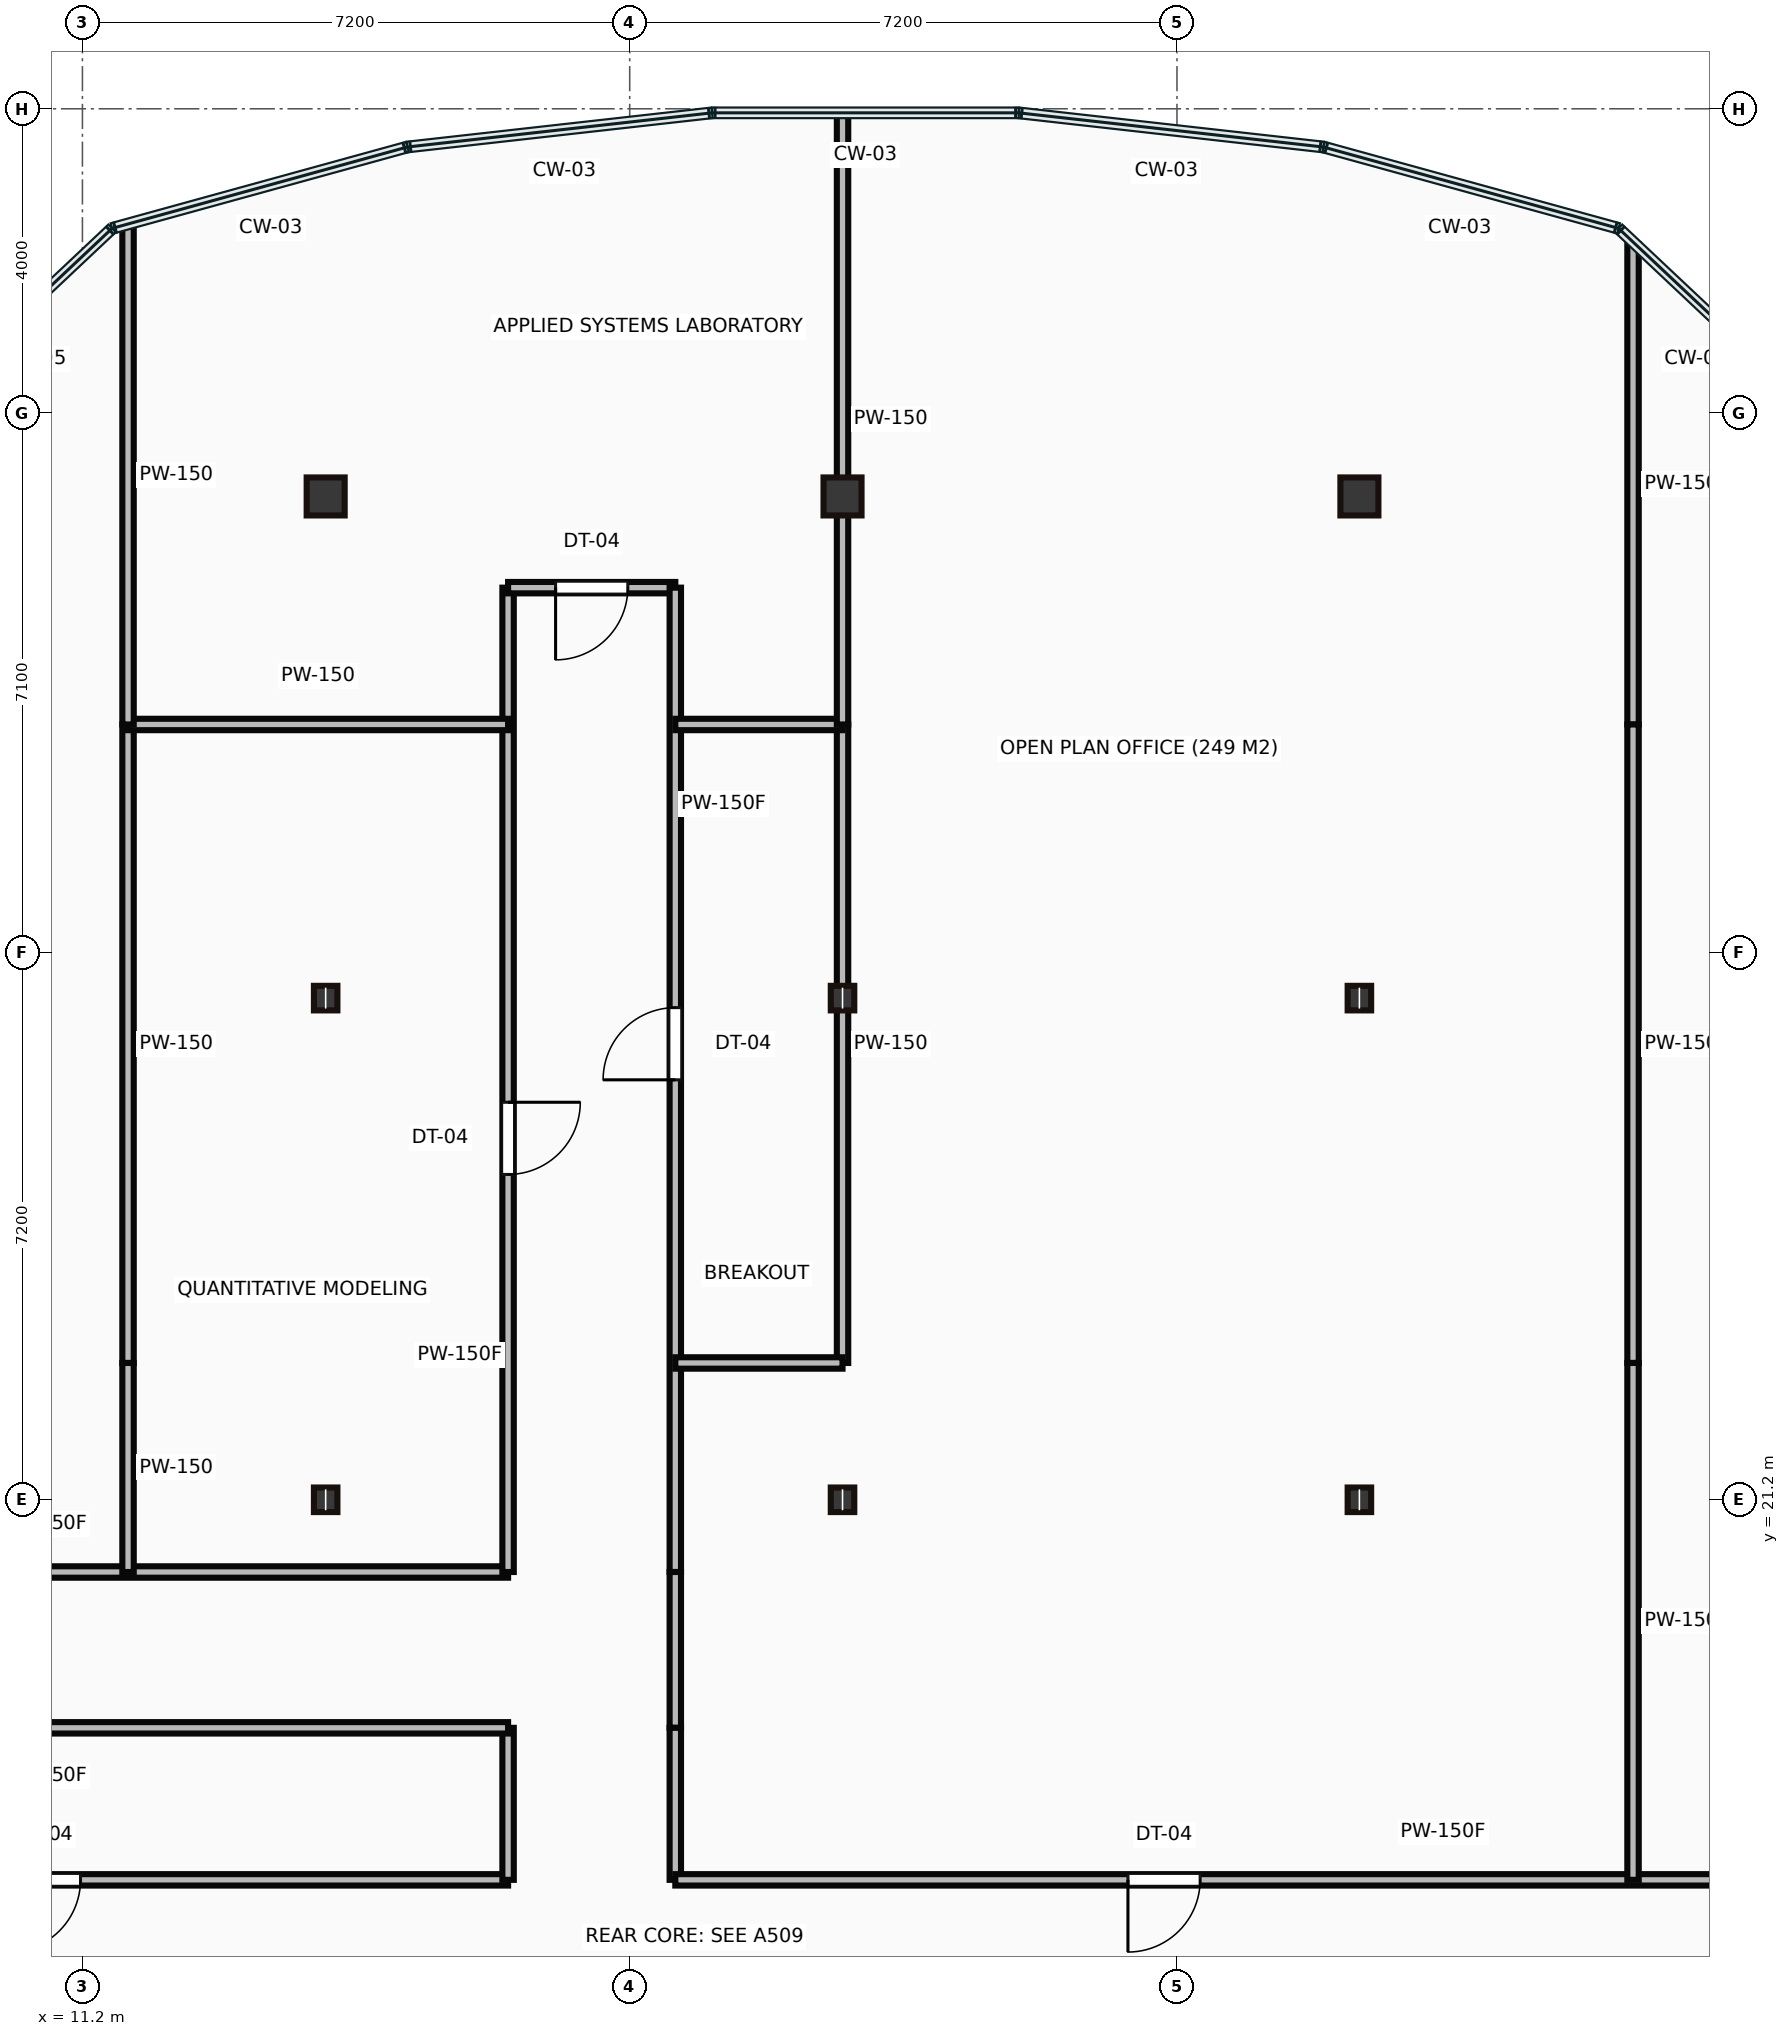
"""IFC4 building model, lengths in metres.
Left out: names, types, materials, properties, quantities, classifications, styles, units other than length and angle.
Written with IfcOpenShell. Run it as: python <this file> out.ifc"""

import sys

from ifc_helpers import new_model, si_unit, direction, frame, frame_2d, origin, origin_2d, place, context, subcontext, project, spatial, rectangle, hollow_rectangle, i_section, extrude, source, transform, mapped, element, fill, save


model = new_model("IFC4")
c1 = context("Model", 3, precision=1e-05, world=origin(), true_north=direction((0.0, 1.0)))
c2 = subcontext(c1, "Body", "Model", "MODEL_VIEW")
j1 = project(units=[si_unit("LENGTHUNIT", "METRE"), si_unit("PLANEANGLEUNIT", "RADIAN")], contexts=[c1])
p1 = place(None, origin())
s1 = spatial("IfcSite", under=j1, at=p1, CompositionType="ELEMENT")
p2 = place(p1, origin())
s2 = spatial("IfcBuilding", under=s1, at=p2, CompositionType="ELEMENT")
p3 = place(p2, frame((0.0, 0.0, 206.85)))
s3 = spatial("IfcBuildingStorey", under=s2, at=p3, CompositionType="ELEMENT", Elevation=206.85)
m1 = source(origin(), c2, "Body", "SweptSolid", [
    extrude(i_section(OverallWidth=0.309, OverallDepth=0.323, WebThickness=0.014, FlangeThickness=0.023, at=origin_2d()), origin(), (0.0, 0.0, 1.0), 3.65),
])
for number, where, z_axis, x_axis in (
    (1, (14.4, 21.2, 0.0), (0.0, 0.0, 1.0), (1.0, 0.0, 0.0)),
    (2, (14.4, 27.8, 0.0), (0.0, 0.0, 1.0), (1.0, 0.0, 0.0)),
):
    element("IfcColumn", number, at=place(p3, frame(where, z_axis=z_axis, x_axis=x_axis)), inside=s3, PredefinedType="COLUMN", context=c2, shape_type="MappedRepresentation", body=[
        mapped(m1, transform((0.0, 0.0, 0.0))),
    ])
m2 = source(origin(), c2, "Body", "SweptSolid", [
    extrude(hollow_rectangle(XDim=0.5, YDim=0.5, WallThickness=0.022, at=origin_2d()), origin(), (0.0, 0.0, 1.0), 3.65),
])
p4 = place(p3, frame((14.4, 34.4, 0.0), z_axis=(0.0, 0.0, 1.0), x_axis=(1.0, 0.0, 0.0)))
e3 = element("IfcColumn", 3, at=p4, inside=s3, PredefinedType="COLUMN", context=c2, shape_type="MappedRepresentation", body=[
    mapped(m2, transform((0.0, 0.0, 0.0))),
])
for number, where, z_axis, x_axis in (
    (4, (21.2, 21.2, 0.0), (0.0, 0.0, 1.0), (1.0, 0.0, 0.0)),
    (5, (21.2, 27.8, 0.0), (0.0, 0.0, 1.0), (1.0, 0.0, 0.0)),
):
    element("IfcColumn", number, at=place(p3, frame(where, z_axis=z_axis, x_axis=x_axis)), inside=s3, PredefinedType="COLUMN", context=c2, shape_type="MappedRepresentation", body=[
        mapped(m1, transform((0.0, 0.0, 0.0))),
    ])
p5 = place(p3, frame((21.2, 34.4, 0.0), z_axis=(0.0, 0.0, 1.0), x_axis=(1.0, 0.0, 0.0)))
e6 = element("IfcColumn", 6, at=p5, inside=s3, PredefinedType="COLUMN", context=c2, shape_type="MappedRepresentation", body=[
    mapped(m2, transform((0.0, 0.0, 0.0))),
])
for number, where, z_axis, x_axis in (
    (7, (28.0, 21.2, 0.0), (0.0, 0.0, 1.0), (1.0, 0.0, 0.0)),
    (8, (28.0, 27.8, 0.0), (0.0, 0.0, 1.0), (1.0, 0.0, 0.0)),
):
    element("IfcColumn", number, at=place(p3, frame(where, z_axis=z_axis, x_axis=x_axis)), inside=s3, PredefinedType="COLUMN", context=c2, shape_type="MappedRepresentation", body=[
        mapped(m1, transform((0.0, 0.0, 0.0))),
    ])
p6 = place(p3, frame((28.0, 34.4, 0.0), z_axis=(0.0, 0.0, 1.0), x_axis=(1.0, 0.0, 0.0)))
e9 = element("IfcColumn", 9, at=p6, inside=s3, PredefinedType="COLUMN", context=c2, shape_type="MappedRepresentation", body=[
    mapped(m2, transform((0.0, 0.0, 0.0))),
])
m3 = source(origin(), c2, "Body", "SweptSolid", [
    extrude(rectangle(XDim=12.2, YDim=0.15, at=frame_2d((6.1, 0.0))), origin(), (0.0, 0.0, 1.0), 3.4),
])
p7 = place(p3, frame((4.6, 16.2, 0.0), z_axis=(0.0, 0.0, 1.0), x_axis=(1.0, 0.0, 0.0)))
e10 = element("IfcWall", 10, at=p7, inside=s3, PredefinedType="PARTITIONING", context=c2, shape_type="MappedRepresentation", body=[
    mapped(m3, transform((0.0, 0.0, 0.0))),
])
p8 = place(p7, frame((5.625, 0.0, 0.0)))
e11 = element("IfcOpeningElement", 11, at=p8, cuts=e10, PredefinedType="OPENING", context=c2, shape_type="SweptSolid", body=[
    extrude(rectangle(XDim=0.95, YDim=2.15, at=frame_2d((0.475, 1.075))), frame((0.0, 0.085, 0.0), z_axis=(0.0, -1.0, 0.0), x_axis=(1.0, 0.0, 0.0)), (0.0, 0.0, 1.0), 0.17),
])
m4 = source(origin(), c2, "Body", "SweptSolid", [
    extrude(rectangle(XDim=2.0, YDim=0.15, at=frame_2d((1.0, 0.0))), origin(), (0.0, 0.0, 1.0), 3.4),
])
p9 = place(p3, frame((16.8, 16.2, 0.0), z_axis=(0.0, 0.0, 1.0), x_axis=(0.0, 1.0, 0.0)))
e12 = element("IfcWall", 12, at=p9, inside=s3, PredefinedType="PARTITIONING", context=c2, shape_type="MappedRepresentation", body=[
    mapped(m4, transform((0.0, 0.0, 0.0))),
])
for number, where, z_axis, x_axis in (
    (13, (16.8, 18.2, 0.0), (0.0, 0.0, 1.0), (-1.0, 0.0, 0.0)),
    (14, (4.6, 20.25, 0.0), (0.0, 0.0, 1.0), (1.0, 0.0, 0.0)),
):
    element("IfcWall", number, at=place(p3, frame(where, z_axis=z_axis, x_axis=x_axis)), inside=s3, PredefinedType="PARTITIONING", context=c2, shape_type="MappedRepresentation", body=[
        mapped(m3, transform((0.0, 0.0, 0.0))),
    ])
m5 = source(origin(), c2, "Body", "SweptSolid", [
    extrude(rectangle(XDim=12.95, YDim=0.15, at=frame_2d((6.475, 0.0))), origin(), (0.0, 0.0, 1.0), 3.4),
])
p10 = place(p3, frame((16.8, 20.25, 0.0), z_axis=(0.0, 0.0, 1.0), x_axis=(0.0, 1.0, 0.0)))
e15 = element("IfcWall", 15, at=p10, inside=s3, PredefinedType="PARTITIONING", context=c2, shape_type="MappedRepresentation", body=[
    mapped(m5, transform((0.0, 0.0, 0.0))),
])
p11 = place(p10, frame((5.23, 0.0, 0.0)))
e16 = element("IfcOpeningElement", 16, at=p11, cuts=e15, PredefinedType="OPENING", context=c2, shape_type="SweptSolid", body=[
    extrude(rectangle(XDim=0.95, YDim=2.15, at=frame_2d((0.475, 1.075))), frame((0.0, 0.085, 0.0), z_axis=(0.0, -1.0, 0.0), x_axis=(1.0, 0.0, 0.0)), (0.0, 0.0, 1.0), 0.17),
])
m6 = source(origin(), c2, "Body", "SweptSolid", [
    extrude(rectangle(XDim=2.2, YDim=0.15, at=frame_2d((1.1, 0.0))), origin(), (0.0, 0.0, 1.0), 3.4),
])
p12 = place(p3, frame((16.8, 33.2, 0.0), z_axis=(0.0, 0.0, 1.0), x_axis=(1.0, 0.0, 0.0)))
e17 = element("IfcWall", 17, at=p12, inside=s3, PredefinedType="PARTITIONING", context=c2, shape_type="MappedRepresentation", body=[
    mapped(m6, transform((0.0, 0.0, 0.0))),
])
p13 = place(p12, frame((0.625, 0.0, 0.0)))
e18 = element("IfcOpeningElement", 18, at=p13, cuts=e17, PredefinedType="OPENING", context=c2, shape_type="SweptSolid", body=[
    extrude(rectangle(XDim=0.95, YDim=2.15, at=frame_2d((0.475, 1.075))), frame((0.0, 0.085, 0.0), z_axis=(0.0, -1.0, 0.0), x_axis=(1.0, 0.0, 0.0)), (0.0, 0.0, 1.0), 0.17),
])
p14 = place(p3, frame((19.0, 33.2, 0.0), z_axis=(0.0, 0.0, 1.0), x_axis=(0.0, -1.0, 0.0)))
e19 = element("IfcWall", 19, at=p14, inside=s3, PredefinedType="PARTITIONING", context=c2, shape_type="MappedRepresentation", body=[
    mapped(m5, transform((0.0, 0.0, 0.0))),
])
p15 = place(p14, frame((5.525, 0.0, 0.0)))
e20 = element("IfcOpeningElement", 20, at=p15, cuts=e19, PredefinedType="OPENING", context=c2, shape_type="SweptSolid", body=[
    extrude(rectangle(XDim=0.95, YDim=2.15, at=frame_2d((0.475, 1.075))), frame((0.0, 0.085, 0.0), z_axis=(0.0, -1.0, 0.0), x_axis=(1.0, 0.0, 0.0)), (0.0, 0.0, 1.0), 0.17),
])
m7 = source(origin(), c2, "Body", "SweptSolid", [
    extrude(rectangle(XDim=2.05, YDim=0.15, at=frame_2d((1.025, 0.0))), origin(), (0.0, 0.0, 1.0), 3.4),
])
p16 = place(p3, frame((19.0, 20.25, 0.0), z_axis=(0.0, 0.0, 1.0), x_axis=(0.0, -1.0, 0.0)))
e21 = element("IfcWall", 21, at=p16, inside=s3, PredefinedType="PARTITIONING", context=c2, shape_type="MappedRepresentation", body=[
    mapped(m7, transform((0.0, 0.0, 0.0))),
])
p17 = place(p3, frame((19.0, 18.2, 0.0), z_axis=(0.0, 0.0, 1.0), x_axis=(0.0, -1.0, 0.0)))
e22 = element("IfcWall", 22, at=p17, inside=s3, PredefinedType="PARTITIONING", context=c2, shape_type="MappedRepresentation", body=[
    mapped(m4, transform((0.0, 0.0, 0.0))),
])
m8 = source(origin(), c2, "Body", "SweptSolid", [
    extrude(rectangle(XDim=20.2, YDim=0.15, at=frame_2d((10.1, 0.0))), origin(), (0.0, 0.0, 1.0), 3.4),
])
p18 = place(p3, frame((19.0, 16.2, 0.0), z_axis=(0.0, 0.0, 1.0), x_axis=(1.0, 0.0, 0.0)))
e23 = element("IfcWall", 23, at=p18, inside=s3, PredefinedType="PARTITIONING", context=c2, shape_type="MappedRepresentation", body=[
    mapped(m8, transform((0.0, 0.0, 0.0))),
])
p19 = place(p18, frame((5.955, 0.0, 0.0)))
e24 = element("IfcOpeningElement", 24, at=p19, cuts=e23, PredefinedType="OPENING", context=c2, shape_type="SweptSolid", body=[
    extrude(rectangle(XDim=0.95, YDim=2.15, at=frame_2d((0.475, 1.075))), frame((0.0, 0.085, 0.0), z_axis=(0.0, -1.0, 0.0), x_axis=(1.0, 0.0, 0.0)), (0.0, 0.0, 1.0), 0.17),
])
p20 = place(p18, frame((15.795, 0.0, 0.0)))
e25 = element("IfcOpeningElement", 25, at=p20, cuts=e23, PredefinedType="OPENING", context=c2, shape_type="SweptSolid", body=[
    extrude(rectangle(XDim=0.95, YDim=2.15, at=frame_2d((0.475, 1.075))), frame((0.0, 0.085, 0.0), z_axis=(0.0, -1.0, 0.0), x_axis=(1.0, 0.0, 0.0)), (0.0, 0.0, 1.0), 0.17),
])
m9 = source(origin(), c2, "Body", "SweptSolid", [
    extrude(rectangle(XDim=8.4, YDim=0.15, at=frame_2d((4.2, 0.0))), origin(), (0.0, 0.0, 1.0), 3.4),
])
p21 = place(p3, frame((11.8, 31.4, 0.0), z_axis=(0.0, 0.0, 1.0), x_axis=(0.0, -1.0, 0.0)))
e26 = element("IfcWall", 26, at=p21, inside=s3, PredefinedType="PARTITIONING", context=c2, shape_type="MappedRepresentation", body=[
    mapped(m9, transform((0.0, 0.0, 0.0))),
])
m10 = source(origin(), c2, "Body", "SweptSolid", [
    extrude(rectangle(XDim=2.75, YDim=0.15, at=frame_2d((1.375, 0.0))), origin(), (0.0, 0.0, 1.0), 3.4),
])
p22 = place(p3, frame((11.8, 23.0, 0.0), z_axis=(0.0, 0.0, 1.0), x_axis=(0.0, -1.0, 0.0)))
e27 = element("IfcWall", 27, at=p22, inside=s3, PredefinedType="PARTITIONING", context=c2, shape_type="MappedRepresentation", body=[
    mapped(m10, transform((0.0, 0.0, 0.0))),
])
m11 = source(origin(), c2, "Body", "SweptSolid", [
    extrude(rectangle(XDim=5.0, YDim=0.15, at=frame_2d((2.5, 0.0))), origin(), (0.0, 0.0, 1.0), 3.4),
])
p23 = place(p3, frame((11.8, 31.4, 0.0), z_axis=(0.0, 0.0, 1.0), x_axis=(1.0, 0.0, 0.0)))
e28 = element("IfcWall", 28, at=p23, inside=s3, PredefinedType="PARTITIONING", context=c2, shape_type="MappedRepresentation", body=[
    mapped(m11, transform((0.0, 0.0, 0.0))),
])
m12 = source(origin(), c2, "Body", "SweptSolid", [
    extrude(rectangle(XDim=6.564, YDim=0.15, at=frame_2d((3.282, 0.0))), origin(), (0.0, 0.0, 1.0), 3.4),
])
p24 = place(p3, frame((11.8, 37.964, 0.0), z_axis=(0.0, 0.0, 1.0), x_axis=(0.0, -1.0, 0.0)))
e29 = element("IfcWall", 29, at=p24, inside=s3, PredefinedType="PARTITIONING", context=c2, shape_type="MappedRepresentation", body=[
    mapped(m12, transform((0.0, 0.0, 0.0))),
])
m13 = source(origin(), c2, "Body", "SweptSolid", [
    extrude(rectangle(XDim=8.4, YDim=0.15, at=frame_2d((4.2, 0.0))), origin(), (0.0, 0.0, 1.0), 2.787),
])
p25 = place(p3, frame((21.2, 31.4, 0.0), z_axis=(0.0, 0.0, 1.0), x_axis=(0.0, -1.0, 0.0)))
e30 = element("IfcWall", 30, at=p25, inside=s3, PredefinedType="PARTITIONING", context=c2, shape_type="MappedRepresentation", body=[
    mapped(m13, transform((0.0, 0.0, 0.0))),
])
for number, where, z_axis, x_axis in (
    (31, (21.2, 23.0, 0.0), (0.0, 0.0, 1.0), (-1.0, 0.0, 0.0)),
    (32, (21.2, 31.4, 0.0), (0.0, 0.0, 1.0), (-1.0, 0.0, 0.0)),
):
    element("IfcWall", number, at=place(p3, frame(where, z_axis=z_axis, x_axis=x_axis)), inside=s3, PredefinedType="PARTITIONING", context=c2, shape_type="MappedRepresentation", body=[
        mapped(m6, transform((0.0, 0.0, 0.0))),
    ])
m14 = source(origin(), c2, "Body", "SweptSolid", [
    extrude(rectangle(XDim=8.027, YDim=0.15, at=frame_2d((4.013, 0.0))), origin(), (0.0, 0.0, 1.0), 2.787),
])
p26 = place(p3, frame((21.2, 39.427, 0.0), z_axis=(0.0, 0.0, 1.0), x_axis=(0.0, -1.0, 0.0)))
e33 = element("IfcWall", 33, at=p26, inside=s3, PredefinedType="PARTITIONING", context=c2, shape_type="MappedRepresentation", body=[
    mapped(m14, transform((0.0, 0.0, 0.0))),
])
m15 = source(origin(), c2, "Body", "SweptSolid", [
    extrude(rectangle(XDim=6.32, YDim=0.15, at=frame_2d((3.16, 0.0))), origin(), (0.0, 0.0, 1.0), 3.4),
])
p27 = place(p3, frame((31.6, 37.72, 0.0), z_axis=(0.0, 0.0, 1.0), x_axis=(0.0, -1.0, 0.0)))
e34 = element("IfcWall", 34, at=p27, inside=s3, PredefinedType="PARTITIONING", context=c2, shape_type="MappedRepresentation", body=[
    mapped(m15, transform((0.0, 0.0, 0.0))),
])
p28 = place(p3, frame((31.6, 31.4, 0.0), z_axis=(0.0, 0.0, 1.0), x_axis=(0.0, -1.0, 0.0)))
e35 = element("IfcWall", 35, at=p28, inside=s3, PredefinedType="PARTITIONING", context=c2, shape_type="MappedRepresentation", body=[
    mapped(m9, transform((0.0, 0.0, 0.0))),
])
m16 = source(origin(), c2, "Body", "SweptSolid", [
    extrude(rectangle(XDim=6.8, YDim=0.15, at=frame_2d((3.4, 0.0))), origin(), (0.0, 0.0, 1.0), 3.4),
])
p29 = place(p3, frame((31.6, 23.0, 0.0), z_axis=(0.0, 0.0, 1.0), x_axis=(0.0, -1.0, 0.0)))
e36 = element("IfcWall", 36, at=p29, inside=s3, PredefinedType="PARTITIONING", context=c2, shape_type="MappedRepresentation", body=[
    mapped(m16, transform((0.0, 0.0, 0.0))),
])
m17 = source(origin(), c2, "Body", "SweptSolid", [
    extrude(rectangle(XDim=0.95, YDim=2.15, at=frame_2d((0.475, 1.075))), frame((0.0, 0.025, 0.0), z_axis=(0.0, -1.0, 0.0), x_axis=(1.0, 0.0, 0.0)), (0.0, 0.0, 1.0), 0.05),
])
p30 = place(p8, origin())
e37 = element("IfcDoor", 37, at=p30, inside=s3, OperationType="SINGLE_SWING_LEFT", PredefinedType="DOOR", context=c2, shape_type="MappedRepresentation", body=[
    mapped(m17, transform((0.0, 0.0, 0.0))),
])
fill(e11, e37)
p31 = place(p11, origin())
e38 = element("IfcDoor", 38, at=p31, inside=s3, OperationType="SINGLE_SWING_RIGHT", PredefinedType="DOOR", context=c2, shape_type="MappedRepresentation", body=[
    mapped(m17, transform((0.0, 0.0, 0.0))),
])
fill(e16, e38)
p32 = place(p13, origin())
e39 = element("IfcDoor", 39, at=p32, inside=s3, OperationType="SINGLE_SWING_LEFT", PredefinedType="DOOR", context=c2, shape_type="MappedRepresentation", body=[
    mapped(m17, transform((0.0, 0.0, 0.0))),
])
fill(e18, e39)
p33 = place(p15, origin())
e40 = element("IfcDoor", 40, at=p33, inside=s3, OperationType="SINGLE_SWING_RIGHT", PredefinedType="DOOR", context=c2, shape_type="MappedRepresentation", body=[
    mapped(m17, transform((0.0, 0.0, 0.0))),
])
fill(e20, e40)
p34 = place(p19, origin())
e41 = element("IfcDoor", 41, at=p34, inside=s3, OperationType="SINGLE_SWING_LEFT", PredefinedType="DOOR", context=c2, shape_type="MappedRepresentation", body=[
    mapped(m17, transform((0.0, 0.0, 0.0))),
])
fill(e24, e41)
save(model, sys.argv[1])
